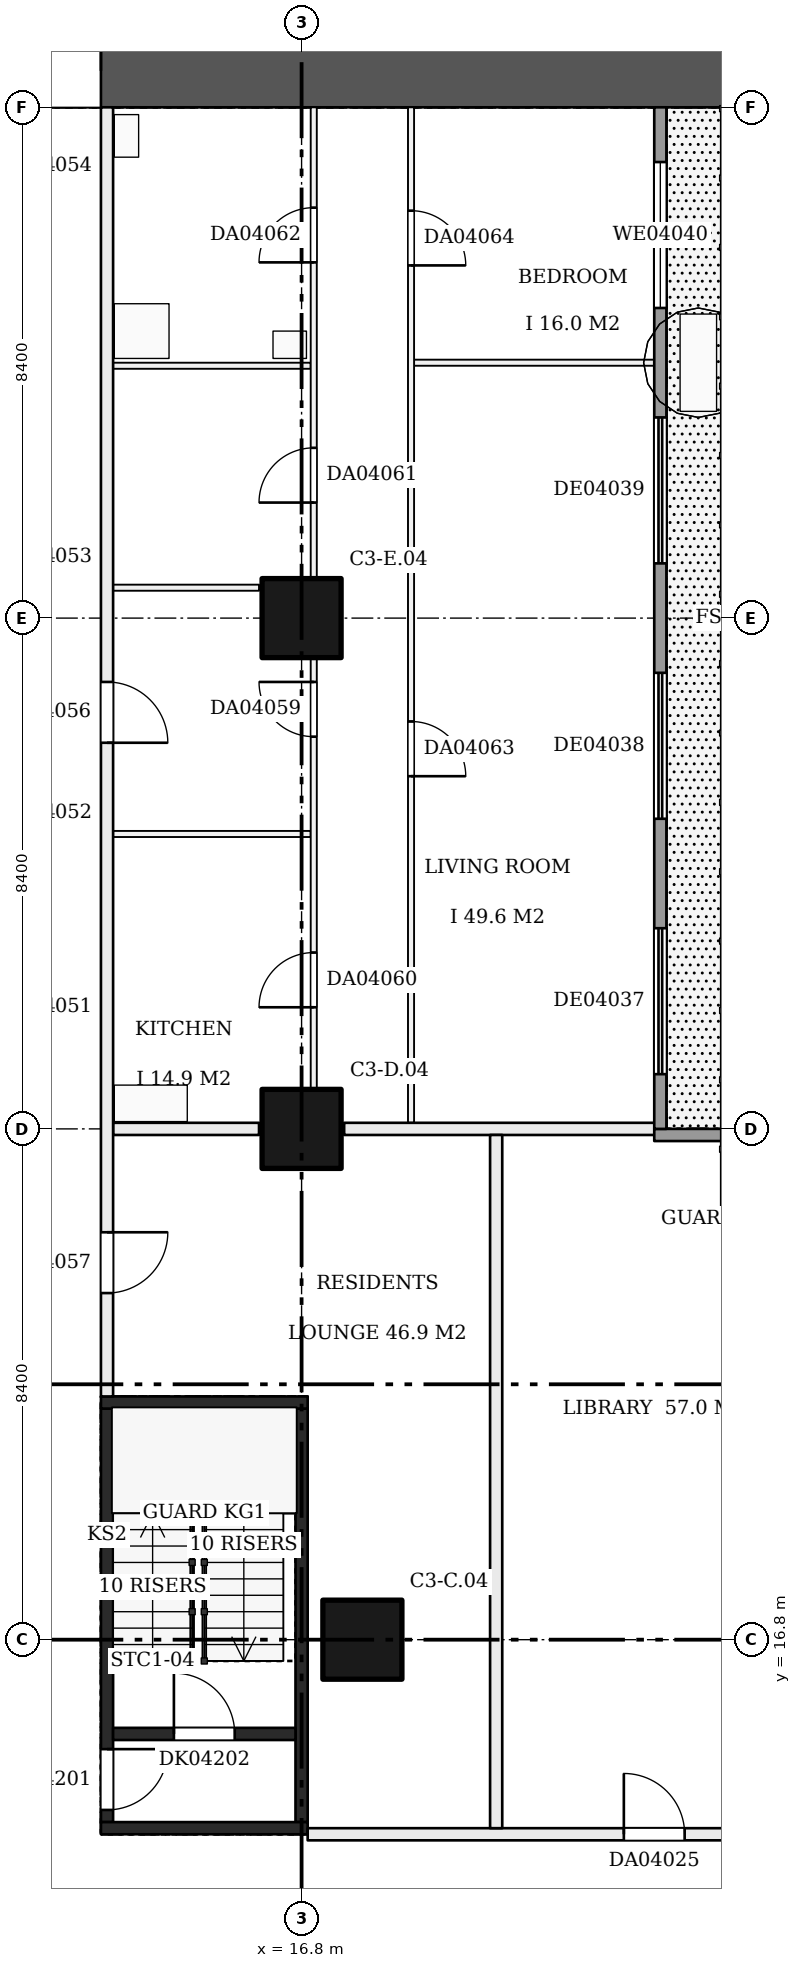
"""IFC4 building model, lengths in metres.
Left out: names, types, materials, properties, quantities, classifications, styles, units other than length and angle.
Written with IfcOpenShell. Run it as: python <this file> out.ifc"""

import sys

from ifc_helpers import new_model, si_unit, direction, frame, frame_2d, origin, origin_2d, place, context, subcontext, project, spatial, rectangle, extrude, element, fill, save


model = new_model("IFC4")
c1 = context("Model", 3, precision=1e-05, world=origin(), true_north=direction((0.0, 1.0)))
c2 = subcontext(c1, "Body", "Model", "MODEL_VIEW")
j1 = project(units=[si_unit("LENGTHUNIT", "METRE"), si_unit("PLANEANGLEUNIT", "RADIAN")], contexts=[c1])
p1 = place(None, origin())
s1 = spatial("IfcSite", under=j1, at=p1, CompositionType="ELEMENT")
p2 = place(p1, origin())
s2 = spatial("IfcBuilding", under=s1, at=p2, CompositionType="ELEMENT")
p3 = place(p2, frame((0.0, 0.0, 25.2)))
s3 = spatial("IfcBuildingStorey", under=s2, at=p3, CompositionType="ELEMENT", Elevation=25.2)
for number, where, z_axis, x_axis in (
    (1, (17.8, 16.8, 0.0), (0.0, 0.0, 1.0), (1.0, 0.0, 0.0)),
    (2, (16.8, 25.2, 0.0), (0.0, 0.0, 1.0), (1.0, 0.0, 0.0)),
    (3, (16.8, 33.6, 0.0), (0.0, 0.0, 1.0), (1.0, 0.0, 0.0)),
):
    element("IfcColumn", number, at=place(p3, frame(where, z_axis=z_axis, x_axis=x_axis)), inside=s3, PredefinedType="COLUMN", context=c2, shape_type="SweptSolid", body=[
        extrude(rectangle(XDim=1.3, YDim=1.3, at=origin_2d()), origin(), (0.0, 0.0, 1.0), 3.22),
    ])
p4 = place(p3, frame((9.6, 42.6, 0.0), z_axis=(0.0, 0.0, 1.0), x_axis=(1.0, 0.0, 0.0)))
e4 = element("IfcWall", 4, at=p4, inside=s3, PredefinedType="SHEAR", context=c2, shape_type="SweptSolid", body=[
    extrude(rectangle(XDim=14.4, YDim=1.2, at=frame_2d((7.2, 0.0))), origin(), (0.0, 0.0, 1.0), 3.22),
])
p5 = place(p4, frame((2.1, 0.0, 0.0)))
e5 = element("IfcOpeningElement", 5, at=p5, cuts=e4, PredefinedType="OPENING", context=c2, shape_type="SweptSolid", body=[
    extrude(rectangle(XDim=1.8, YDim=2.1, at=frame_2d((0.9, 1.05))), frame((0.0, 0.61, 0.0), z_axis=(0.0, -1.0, 0.0), x_axis=(1.0, 0.0, 0.0)), (0.0, 0.0, 1.0), 1.22),
])
p6 = place(p3, frame((13.6, 13.8, 0.0), z_axis=(0.0, 0.0, 1.0), x_axis=(0.0, 1.0, 0.0)))
e6 = element("IfcWall", 6, at=p6, inside=s3, PredefinedType="SHEAR", context=c2, shape_type="SweptSolid", body=[
    extrude(rectangle(XDim=6.8, YDim=0.2, at=frame_2d((3.4, 0.0))), origin(), (0.0, 0.0, 1.0), 3.22),
])
p7 = place(p6, frame((0.2, 0.0, 0.0)))
e7 = element("IfcOpeningElement", 7, at=p7, cuts=e6, PredefinedType="OPENING", context=c2, shape_type="SweptSolid", body=[
    extrude(rectangle(XDim=1.0, YDim=2.1, at=frame_2d((0.5, 1.05))), frame((0.0, 0.11, 0.0), z_axis=(0.0, -1.0, 0.0), x_axis=(1.0, 0.0, 0.0)), (0.0, 0.0, 1.0), 0.22),
])
p8 = place(p3, frame((16.8, 13.8, 0.0), z_axis=(0.0, 0.0, 1.0), x_axis=(0.0, 1.0, 0.0)))
e8 = element("IfcWall", 8, at=p8, inside=s3, PredefinedType="SHEAR", context=c2, shape_type="SweptSolid", body=[
    extrude(rectangle(XDim=6.8, YDim=0.2, at=frame_2d((3.4, 0.0))), origin(), (0.0, 0.0, 1.0), 3.22),
])
for number, where, z_axis, x_axis in (
    (9, (13.5, 13.7, 0.0), (0.0, 0.0, 1.0), (1.0, 0.0, 0.0)),
    (10, (13.5, 20.7, 0.0), (0.0, 0.0, 1.0), (1.0, 0.0, 0.0)),
):
    element("IfcWall", number, at=place(p3, frame(where, z_axis=z_axis, x_axis=x_axis)), inside=s3, PredefinedType="SHEAR", context=c2, shape_type="SweptSolid", body=[
        extrude(rectangle(XDim=3.4, YDim=0.2, at=frame_2d((1.7, 0.0))), origin(), (0.0, 0.0, 1.0), 3.22),
    ])
p9 = place(p3, frame((13.7, 15.25, 0.0), z_axis=(0.0, 0.0, 1.0), x_axis=(1.0, 0.0, 0.0)))
e11 = element("IfcWall", 11, at=p9, inside=s3, PredefinedType="SHEAR", context=c2, shape_type="SweptSolid", body=[
    extrude(rectangle(XDim=3.0, YDim=0.2, at=frame_2d((1.5, 0.0))), origin(), (0.0, 0.0, 1.0), 3.22),
])
p10 = place(p9, frame((1.0, 0.0, 0.0)))
e12 = element("IfcOpeningElement", 12, at=p10, cuts=e11, PredefinedType="OPENING", context=c2, shape_type="SweptSolid", body=[
    extrude(rectangle(XDim=1.0, YDim=2.1, at=frame_2d((0.5, 1.05))), frame((0.0, 0.11, 0.0), z_axis=(0.0, -1.0, 0.0), x_axis=(1.0, 0.0, 0.0)), (0.0, 0.0, 1.0), 0.22),
])
p11 = place(p3, frame((16.9, 13.6, 0.0), z_axis=(0.0, 0.0, 1.0), x_axis=(1.0, 0.0, 0.0)))
e13 = element("IfcWall", 13, at=p11, inside=s3, PredefinedType="PARTITIONING", context=c2, shape_type="SweptSolid", body=[
    extrude(rectangle(XDim=25.1, YDim=0.2, at=frame_2d((12.55, 0.0))), origin(), (0.0, 0.0, 1.0), 3.22),
])
p12 = place(p11, frame((9.8, 0.0, 0.0)))
e14 = element("IfcOpeningElement", 14, at=p12, cuts=e13, PredefinedType="OPENING", context=c2, shape_type="SweptSolid", body=[
    extrude(rectangle(XDim=1.0, YDim=2.1, at=frame_2d((0.5, 1.05))), frame((0.0, 0.11, 0.0), z_axis=(0.0, -1.0, 0.0), x_axis=(1.0, 0.0, 0.0)), (0.0, 0.0, 1.0), 0.22),
])
p13 = place(p11, frame((5.2, 0.0, 0.0)))
e15 = element("IfcOpeningElement", 15, at=p13, cuts=e13, PredefinedType="OPENING", context=c2, shape_type="SweptSolid", body=[
    extrude(rectangle(XDim=1.0, YDim=2.1, at=frame_2d((0.5, 1.05))), frame((0.0, 0.11, 0.0), z_axis=(0.0, -1.0, 0.0), x_axis=(1.0, 0.0, 0.0)), (0.0, 0.0, 1.0), 0.22),
])
p14 = place(p3, frame((13.7, 25.2, 0.0), z_axis=(0.0, 0.0, 1.0), x_axis=(1.0, 0.0, 0.0)))
e16 = element("IfcWall", 16, at=p14, inside=s3, PredefinedType="PARTITIONING", context=c2, shape_type="SweptSolid", body=[
    extrude(rectangle(XDim=2.4, YDim=0.2, at=frame_2d((1.2, 0.0))), origin(), (0.0, 0.0, 1.0), 3.22),
])
p15 = place(p3, frame((17.5, 25.2, 0.0), z_axis=(0.0, 0.0, 1.0), x_axis=(1.0, 0.0, 0.0)))
e17 = element("IfcWall", 17, at=p15, inside=s3, PredefinedType="PARTITIONING", context=c2, shape_type="SweptSolid", body=[
    extrude(rectangle(XDim=5.2, YDim=0.2, at=frame_2d((2.6, 0.0))), origin(), (0.0, 0.0, 1.0), 3.22),
])
p16 = place(p3, frame((13.7, 30.05, 0.0), z_axis=(0.0, 0.0, 1.0), x_axis=(1.0, 0.0, 0.0)))
e18 = element("IfcWall", 18, at=p16, inside=s3, PredefinedType="PARTITIONING", context=c2, shape_type="SweptSolid", body=[
    extrude(rectangle(XDim=3.25, YDim=0.1, at=frame_2d((1.625, 0.0))), origin(), (0.0, 0.0, 1.0), 3.22),
])
p17 = place(p3, frame((13.7, 34.1, 0.0), z_axis=(0.0, 0.0, 1.0), x_axis=(1.0, 0.0, 0.0)))
e19 = element("IfcWall", 19, at=p17, inside=s3, PredefinedType="PARTITIONING", context=c2, shape_type="SweptSolid", body=[
    extrude(rectangle(XDim=2.4, YDim=0.1, at=frame_2d((1.2, 0.0))), origin(), (0.0, 0.0, 1.0), 3.22),
])
p18 = place(p3, frame((13.7, 37.75, 0.0), z_axis=(0.0, 0.0, 1.0), x_axis=(1.0, 0.0, 0.0)))
e20 = element("IfcWall", 20, at=p18, inside=s3, PredefinedType="PARTITIONING", context=c2, shape_type="SweptSolid", body=[
    extrude(rectangle(XDim=3.25, YDim=0.1, at=frame_2d((1.625, 0.0))), origin(), (0.0, 0.0, 1.0), 3.22),
])
p19 = place(p3, frame((18.65, 37.8, 0.0), z_axis=(0.0, 0.0, 1.0), x_axis=(1.0, 0.0, 0.0)))
e21 = element("IfcWall", 21, at=p19, inside=s3, PredefinedType="PARTITIONING", context=c2, shape_type="SweptSolid", body=[
    extrude(rectangle(XDim=4.05, YDim=0.1, at=frame_2d((2.025, 0.0))), origin(), (0.0, 0.0, 1.0), 3.22),
])
p20 = place(p3, frame((13.6, 20.8, 0.0), z_axis=(0.0, 0.0, 1.0), x_axis=(0.0, 1.0, 0.0)))
e22 = element("IfcWall", 22, at=p20, inside=s3, PredefinedType="PARTITIONING", context=c2, shape_type="SweptSolid", body=[
    extrude(rectangle(XDim=21.2, YDim=0.2, at=frame_2d((10.6, 0.0))), origin(), (0.0, 0.0, 1.0), 3.22),
])
p21 = place(p20, frame((10.75, 0.0, 0.0)))
e23 = element("IfcOpeningElement", 23, at=p21, cuts=e22, PredefinedType="OPENING", context=c2, shape_type="SweptSolid", body=[
    extrude(rectangle(XDim=1.0, YDim=2.1, at=frame_2d((0.5, 1.05))), frame((0.0, 0.11, 0.0), z_axis=(0.0, -1.0, 0.0), x_axis=(1.0, 0.0, 0.0)), (0.0, 0.0, 1.0), 0.22),
])
p22 = place(p20, frame((1.7, 0.0, 0.0)))
e24 = element("IfcOpeningElement", 24, at=p22, cuts=e22, PredefinedType="OPENING", context=c2, shape_type="SweptSolid", body=[
    extrude(rectangle(XDim=1.0, YDim=2.1, at=frame_2d((0.5, 1.05))), frame((0.0, 0.11, 0.0), z_axis=(0.0, -1.0, 0.0), x_axis=(1.0, 0.0, 0.0)), (0.0, 0.0, 1.0), 0.22),
])
p23 = place(p3, frame((17.0, 25.3, 0.0), z_axis=(0.0, 0.0, 1.0), x_axis=(0.0, 1.0, 0.0)))
e25 = element("IfcWall", 25, at=p23, inside=s3, PredefinedType="PARTITIONING", context=c2, shape_type="SweptSolid", body=[
    extrude(rectangle(XDim=16.7, YDim=0.1, at=frame_2d((8.35, 0.0))), origin(), (0.0, 0.0, 1.0), 3.22),
])
p24 = place(p23, frame((6.35, 0.0, 0.0)))
e26 = element("IfcOpeningElement", 26, at=p24, cuts=e25, PredefinedType="OPENING", context=c2, shape_type="SweptSolid", body=[
    extrude(rectangle(XDim=0.9, YDim=2.1, at=frame_2d((0.45, 1.05))), frame((0.0, 0.06, 0.0), z_axis=(0.0, -1.0, 0.0), x_axis=(1.0, 0.0, 0.0)), (0.0, 0.0, 1.0), 0.12),
])
p25 = place(p23, frame((1.9, 0.0, 0.0)))
e27 = element("IfcOpeningElement", 27, at=p25, cuts=e25, PredefinedType="OPENING", context=c2, shape_type="SweptSolid", body=[
    extrude(rectangle(XDim=0.9, YDim=2.1, at=frame_2d((0.45, 1.05))), frame((0.0, 0.06, 0.0), z_axis=(0.0, -1.0, 0.0), x_axis=(1.0, 0.0, 0.0)), (0.0, 0.0, 1.0), 0.12),
])
p26 = place(p23, frame((10.2, 0.0, 0.0)))
e28 = element("IfcOpeningElement", 28, at=p26, cuts=e25, PredefinedType="OPENING", context=c2, shape_type="SweptSolid", body=[
    extrude(rectangle(XDim=0.9, YDim=2.1, at=frame_2d((0.45, 1.05))), frame((0.0, 0.06, 0.0), z_axis=(0.0, -1.0, 0.0), x_axis=(1.0, 0.0, 0.0)), (0.0, 0.0, 1.0), 0.12),
])
p27 = place(p23, frame((14.15, 0.0, 0.0)))
e29 = element("IfcOpeningElement", 29, at=p27, cuts=e25, PredefinedType="OPENING", context=c2, shape_type="SweptSolid", body=[
    extrude(rectangle(XDim=0.9, YDim=2.1, at=frame_2d((0.45, 1.05))), frame((0.0, 0.06, 0.0), z_axis=(0.0, -1.0, 0.0), x_axis=(1.0, 0.0, 0.0)), (0.0, 0.0, 1.0), 0.12),
])
p28 = place(p3, frame((18.6, 25.3, 0.0), z_axis=(0.0, 0.0, 1.0), x_axis=(0.0, 1.0, 0.0)))
e30 = element("IfcWall", 30, at=p28, inside=s3, PredefinedType="PARTITIONING", context=c2, shape_type="SweptSolid", body=[
    extrude(rectangle(XDim=16.7, YDim=0.1, at=frame_2d((8.35, 0.0))), origin(), (0.0, 0.0, 1.0), 3.22),
])
p29 = place(p28, frame((5.7, 0.0, 0.0)))
e31 = element("IfcOpeningElement", 31, at=p29, cuts=e30, PredefinedType="OPENING", context=c2, shape_type="SweptSolid", body=[
    extrude(rectangle(XDim=0.9, YDim=2.1, at=frame_2d((0.45, 1.05))), frame((0.0, 0.06, 0.0), z_axis=(0.0, -1.0, 0.0), x_axis=(1.0, 0.0, 0.0)), (0.0, 0.0, 1.0), 0.12),
])
p30 = place(p28, frame((14.1, 0.0, 0.0)))
e32 = element("IfcOpeningElement", 32, at=p30, cuts=e30, PredefinedType="OPENING", context=c2, shape_type="SweptSolid", body=[
    extrude(rectangle(XDim=0.9, YDim=2.1, at=frame_2d((0.45, 1.05))), frame((0.0, 0.06, 0.0), z_axis=(0.0, -1.0, 0.0), x_axis=(1.0, 0.0, 0.0)), (0.0, 0.0, 1.0), 0.12),
])
p31 = place(p3, frame((20.0, 13.7, 0.0), z_axis=(0.0, 0.0, 1.0), x_axis=(0.0, 1.0, 0.0)))
e33 = element("IfcWall", 33, at=p31, inside=s3, PredefinedType="PARTITIONING", context=c2, shape_type="SweptSolid", body=[
    extrude(rectangle(XDim=11.4, YDim=0.2, at=frame_2d((5.7, 0.0))), origin(), (0.0, 0.0, 1.0), 3.22),
])
p32 = place(p3, frame((24.5, 25.1, 0.0), z_axis=(0.0, 0.0, 1.0), x_axis=(-1.0, 0.0, 0.0)))
e34 = element("IfcWall", 34, at=p32, inside=s3, PredefinedType="SOLIDWALL", context=c2, shape_type="SweptSolid", body=[
    extrude(rectangle(XDim=1.9, YDim=0.2, at=frame_2d((0.95, 0.0))), origin(), (0.0, 0.0, 1.0), 3.22),
])
p33 = place(p3, frame((22.7, 25.2, 0.0), z_axis=(0.0, 0.0, 1.0), x_axis=(0.0, 1.0, 0.0)))
e35 = element("IfcWall", 35, at=p33, inside=s3, PredefinedType="SOLIDWALL", context=c2, shape_type="SweptSolid", body=[
    extrude(rectangle(XDim=16.8, YDim=0.2, at=frame_2d((8.4, 0.0))), origin(), (0.0, 0.0, 1.0), 3.22),
])
p34 = place(p33, frame((0.9, 0.0, 0.0)))
e36 = element("IfcOpeningElement", 36, at=p34, cuts=e35, PredefinedType="OPENING", context=c2, shape_type="SweptSolid", body=[
    extrude(rectangle(XDim=2.4, YDim=2.2, at=frame_2d((1.2, 1.1))), frame((0.0, 0.11, 0.0), z_axis=(0.0, -1.0, 0.0), x_axis=(1.0, 0.0, 0.0)), (0.0, 0.0, 1.0), 0.22),
])
p35 = place(p33, frame((5.1, 0.0, 0.0)))
e37 = element("IfcOpeningElement", 37, at=p35, cuts=e35, PredefinedType="OPENING", context=c2, shape_type="SweptSolid", body=[
    extrude(rectangle(XDim=2.4, YDim=2.2, at=frame_2d((1.2, 1.1))), frame((0.0, 0.11, 0.0), z_axis=(0.0, -1.0, 0.0), x_axis=(1.0, 0.0, 0.0)), (0.0, 0.0, 1.0), 0.22),
])
p36 = place(p33, frame((9.3, 0.0, 0.0)))
e38 = element("IfcOpeningElement", 38, at=p36, cuts=e35, PredefinedType="OPENING", context=c2, shape_type="SweptSolid", body=[
    extrude(rectangle(XDim=2.4, YDim=2.2, at=frame_2d((1.2, 1.1))), frame((0.0, 0.11, 0.0), z_axis=(0.0, -1.0, 0.0), x_axis=(1.0, 0.0, 0.0)), (0.0, 0.0, 1.0), 0.22),
])
p37 = place(p33, frame((13.5, 0.0, 0.9)))
e39 = element("IfcOpeningElement", 39, at=p37, cuts=e35, PredefinedType="OPENING", context=c2, shape_type="SweptSolid", body=[
    extrude(rectangle(XDim=2.4, YDim=1.5, at=frame_2d((1.2, 0.75))), frame((0.0, 0.11, 0.0), z_axis=(0.0, -1.0, 0.0), x_axis=(1.0, 0.0, 0.0)), (0.0, 0.0, 1.0), 0.22),
])
p38 = place(p5, origin())
e40 = element("IfcDoor", 40, at=p38, inside=s3, OperationType="DOUBLE_DOOR_SINGLE_SWING", PredefinedType="DOOR", context=c2, shape_type="SweptSolid", body=[
    extrude(rectangle(XDim=1.8, YDim=2.1, at=frame_2d((0.9, 1.05))), frame((0.0, 0.025, 0.0), z_axis=(0.0, -1.0, 0.0), x_axis=(1.0, 0.0, 0.0)), (0.0, 0.0, 1.0), 0.05),
])
fill(e5, e40)
p39 = place(p7, frame((1.0, 0.0, 0.0), z_axis=(0.0, 0.0, 1.0), x_axis=(-1.0, 0.0, 0.0)))
e41 = element("IfcDoor", 41, at=p39, inside=s3, OperationType="SINGLE_SWING_LEFT", PredefinedType="DOOR", context=c2, shape_type="SweptSolid", body=[
    extrude(rectangle(XDim=1.0, YDim=2.1, at=frame_2d((0.5, 1.05))), frame((0.0, 0.025, 0.0), z_axis=(0.0, -1.0, 0.0), x_axis=(1.0, 0.0, 0.0)), (0.0, 0.0, 1.0), 0.05),
])
fill(e7, e41)
p40 = place(p10, origin())
e42 = element("IfcDoor", 42, at=p40, inside=s3, OperationType="SINGLE_SWING_LEFT", PredefinedType="DOOR", context=c2, shape_type="SweptSolid", body=[
    extrude(rectangle(XDim=1.0, YDim=2.1, at=frame_2d((0.5, 1.05))), frame((0.0, 0.025, 0.0), z_axis=(0.0, -1.0, 0.0), x_axis=(1.0, 0.0, 0.0)), (0.0, 0.0, 1.0), 0.05),
])
fill(e12, e42)
p41 = place(p13, origin())
e43 = element("IfcDoor", 43, at=p41, inside=s3, OperationType="SINGLE_SWING_LEFT", PredefinedType="DOOR", context=c2, shape_type="SweptSolid", body=[
    extrude(rectangle(XDim=1.0, YDim=2.1, at=frame_2d((0.5, 1.05))), frame((0.0, 0.025, 0.0), z_axis=(0.0, -1.0, 0.0), x_axis=(1.0, 0.0, 0.0)), (0.0, 0.0, 1.0), 0.05),
])
fill(e15, e43)
p42 = place(p21, frame((1.0, 0.0, 0.0), z_axis=(0.0, 0.0, 1.0), x_axis=(-1.0, 0.0, 0.0)))
e44 = element("IfcDoor", 44, at=p42, inside=s3, OperationType="SINGLE_SWING_RIGHT", PredefinedType="DOOR", context=c2, shape_type="SweptSolid", body=[
    extrude(rectangle(XDim=1.0, YDim=2.1, at=frame_2d((0.5, 1.05))), frame((0.0, 0.025, 0.0), z_axis=(0.0, -1.0, 0.0), x_axis=(1.0, 0.0, 0.0)), (0.0, 0.0, 1.0), 0.05),
])
fill(e23, e44)
p43 = place(p22, frame((1.0, 0.0, 0.0), z_axis=(0.0, 0.0, 1.0), x_axis=(-1.0, 0.0, 0.0)))
e45 = element("IfcDoor", 45, at=p43, inside=s3, OperationType="SINGLE_SWING_LEFT", PredefinedType="DOOR", context=c2, shape_type="SweptSolid", body=[
    extrude(rectangle(XDim=1.0, YDim=2.1, at=frame_2d((0.5, 1.05))), frame((0.0, 0.025, 0.0), z_axis=(0.0, -1.0, 0.0), x_axis=(1.0, 0.0, 0.0)), (0.0, 0.0, 1.0), 0.05),
])
fill(e24, e45)
p44 = place(p24, origin())
e46 = element("IfcDoor", 46, at=p44, inside=s3, OperationType="SINGLE_SWING_RIGHT", PredefinedType="DOOR", context=c2, shape_type="SweptSolid", body=[
    extrude(rectangle(XDim=0.9, YDim=2.1, at=frame_2d((0.45, 1.05))), frame((0.0, 0.025, 0.0), z_axis=(0.0, -1.0, 0.0), x_axis=(1.0, 0.0, 0.0)), (0.0, 0.0, 1.0), 0.05),
])
fill(e26, e46)
p45 = place(p25, origin())
e47 = element("IfcDoor", 47, at=p45, inside=s3, OperationType="SINGLE_SWING_LEFT", PredefinedType="DOOR", context=c2, shape_type="SweptSolid", body=[
    extrude(rectangle(XDim=0.9, YDim=2.1, at=frame_2d((0.45, 1.05))), frame((0.0, 0.025, 0.0), z_axis=(0.0, -1.0, 0.0), x_axis=(1.0, 0.0, 0.0)), (0.0, 0.0, 1.0), 0.05),
])
fill(e27, e47)
p46 = place(p26, origin())
e48 = element("IfcDoor", 48, at=p46, inside=s3, OperationType="SINGLE_SWING_LEFT", PredefinedType="DOOR", context=c2, shape_type="SweptSolid", body=[
    extrude(rectangle(XDim=0.9, YDim=2.1, at=frame_2d((0.45, 1.05))), frame((0.0, 0.025, 0.0), z_axis=(0.0, -1.0, 0.0), x_axis=(1.0, 0.0, 0.0)), (0.0, 0.0, 1.0), 0.05),
])
fill(e28, e48)
p47 = place(p27, origin())
e49 = element("IfcDoor", 49, at=p47, inside=s3, OperationType="SINGLE_SWING_LEFT", PredefinedType="DOOR", context=c2, shape_type="SweptSolid", body=[
    extrude(rectangle(XDim=0.9, YDim=2.1, at=frame_2d((0.45, 1.05))), frame((0.0, 0.025, 0.0), z_axis=(0.0, -1.0, 0.0), x_axis=(1.0, 0.0, 0.0)), (0.0, 0.0, 1.0), 0.05),
])
fill(e29, e49)
p48 = place(p29, frame((0.9, 0.0, 0.0), z_axis=(0.0, 0.0, 1.0), x_axis=(-1.0, 0.0, 0.0)))
e50 = element("IfcDoor", 50, at=p48, inside=s3, OperationType="SINGLE_SWING_RIGHT", PredefinedType="DOOR", context=c2, shape_type="SweptSolid", body=[
    extrude(rectangle(XDim=0.9, YDim=2.1, at=frame_2d((0.45, 1.05))), frame((0.0, 0.025, 0.0), z_axis=(0.0, -1.0, 0.0), x_axis=(1.0, 0.0, 0.0)), (0.0, 0.0, 1.0), 0.05),
])
fill(e31, e50)
p49 = place(p30, frame((0.9, 0.0, 0.0), z_axis=(0.0, 0.0, 1.0), x_axis=(-1.0, 0.0, 0.0)))
e51 = element("IfcDoor", 51, at=p49, inside=s3, OperationType="SINGLE_SWING_RIGHT", PredefinedType="DOOR", context=c2, shape_type="SweptSolid", body=[
    extrude(rectangle(XDim=0.9, YDim=2.1, at=frame_2d((0.45, 1.05))), frame((0.0, 0.025, 0.0), z_axis=(0.0, -1.0, 0.0), x_axis=(1.0, 0.0, 0.0)), (0.0, 0.0, 1.0), 0.05),
])
fill(e32, e51)
p50 = place(p34, origin())
e52 = element("IfcDoor", 52, at=p50, inside=s3, OperationType="DOUBLE_DOOR_SLIDING", PredefinedType="DOOR", context=c2, shape_type="SweptSolid", body=[
    extrude(rectangle(XDim=2.4, YDim=2.2, at=frame_2d((1.2, 1.1))), frame((0.0, 0.025, 0.0), z_axis=(0.0, -1.0, 0.0), x_axis=(1.0, 0.0, 0.0)), (0.0, 0.0, 1.0), 0.05),
])
fill(e36, e52)
p51 = place(p35, origin())
e53 = element("IfcDoor", 53, at=p51, inside=s3, OperationType="DOUBLE_DOOR_SLIDING", PredefinedType="DOOR", context=c2, shape_type="SweptSolid", body=[
    extrude(rectangle(XDim=2.4, YDim=2.2, at=frame_2d((1.2, 1.1))), frame((0.0, 0.025, 0.0), z_axis=(0.0, -1.0, 0.0), x_axis=(1.0, 0.0, 0.0)), (0.0, 0.0, 1.0), 0.05),
])
fill(e37, e53)
p52 = place(p36, origin())
e54 = element("IfcDoor", 54, at=p52, inside=s3, OperationType="DOUBLE_DOOR_SLIDING", PredefinedType="DOOR", context=c2, shape_type="SweptSolid", body=[
    extrude(rectangle(XDim=2.4, YDim=2.2, at=frame_2d((1.2, 1.1))), frame((0.0, 0.025, 0.0), z_axis=(0.0, -1.0, 0.0), x_axis=(1.0, 0.0, 0.0)), (0.0, 0.0, 1.0), 0.05),
])
fill(e38, e54)
p53 = place(p37, origin())
e55 = element("IfcWindow", 55, at=p53, inside=s3, PartitioningType="SINGLE_PANEL", PredefinedType="WINDOW", context=c2, shape_type="SweptSolid", body=[
    extrude(rectangle(XDim=2.4, YDim=1.5, at=frame_2d((1.2, 0.75))), frame((0.0, 0.03, 0.0), z_axis=(0.0, -1.0, 0.0), x_axis=(1.0, 0.0, 0.0)), (0.0, 0.0, 1.0), 0.06),
])
fill(e39, e55)
save(model, sys.argv[1])
